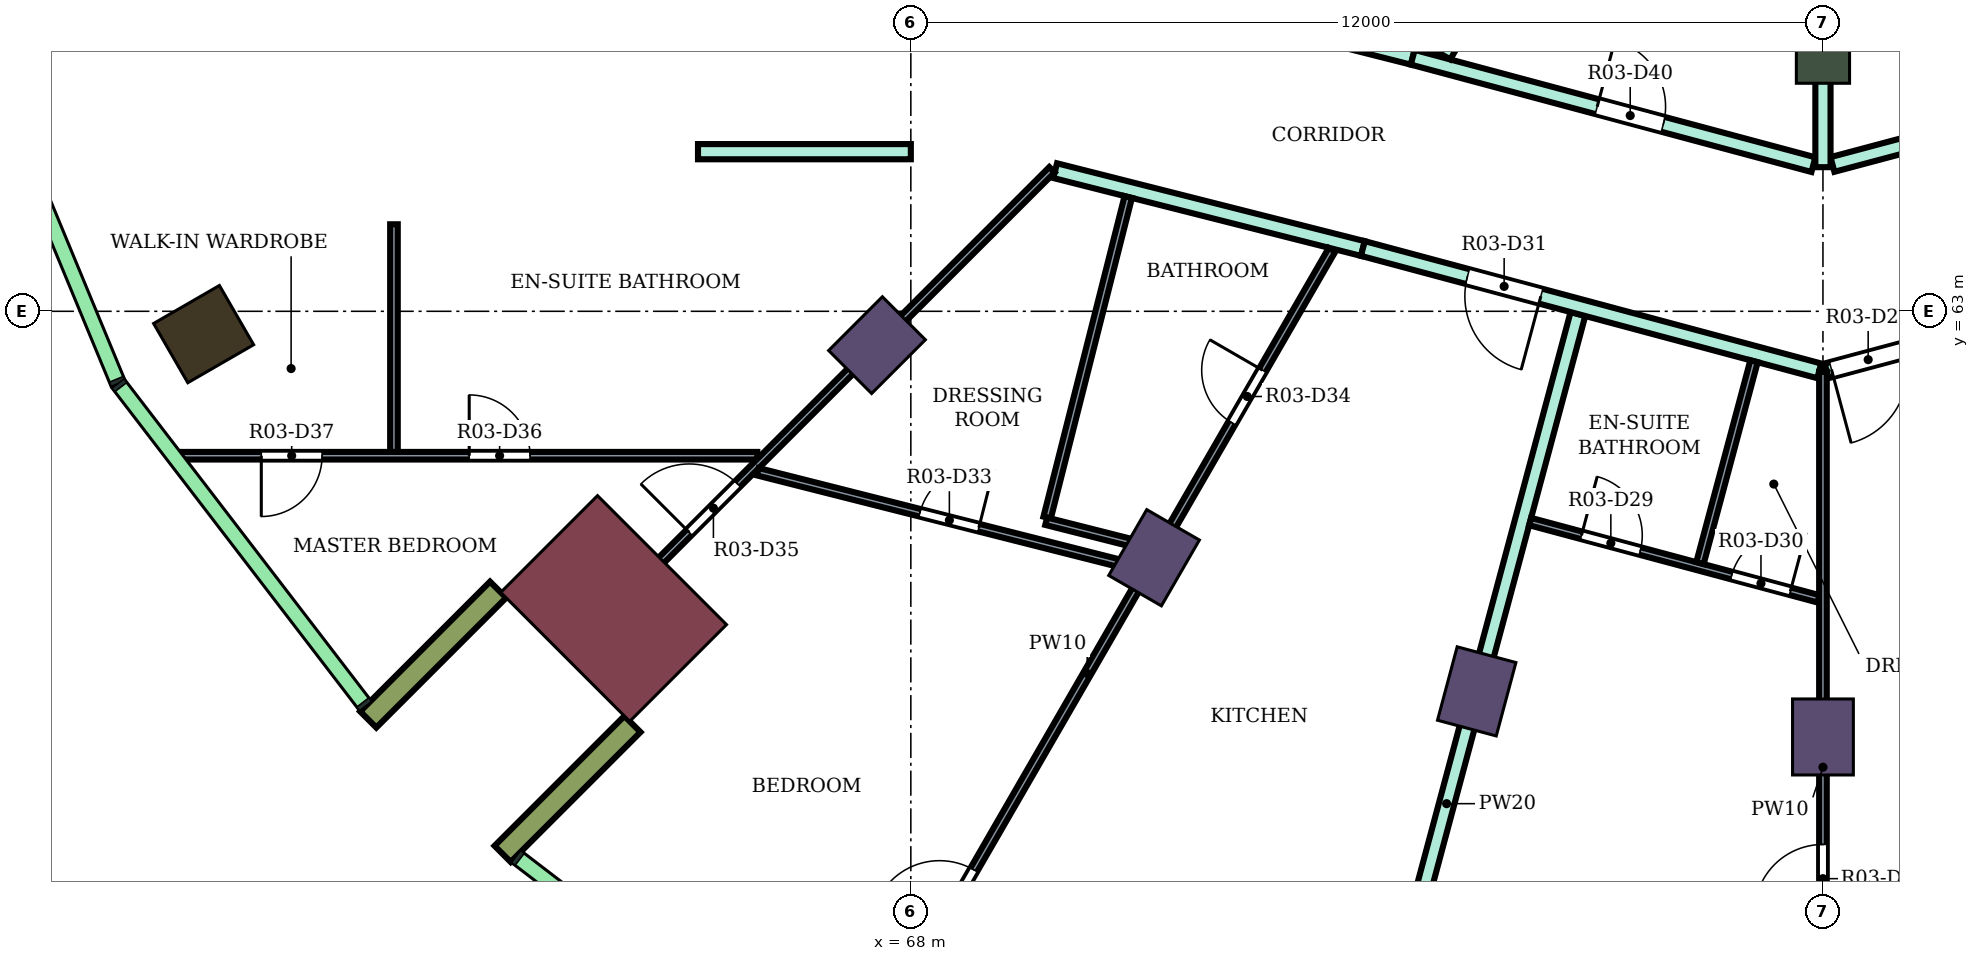
"""IFC4 building model, lengths in metres.
Left out: names, types, materials, properties, quantities, classifications, styles, units other than length and angle.
Written with IfcOpenShell. Run it as: python <this file> out.ifc"""

import sys

from ifc_helpers import new_model, si_unit, direction, frame, frame_2d, origin, origin_2d, place, context, subcontext, project, spatial, rectangle, extrude, element, fill, save


model = new_model("IFC4")
c1 = context("Model", 3, precision=1e-05, world=origin(), true_north=direction((0.0, 1.0)))
c2 = subcontext(c1, "Body", "Model", "MODEL_VIEW")
j1 = project(units=[si_unit("LENGTHUNIT", "METRE"), si_unit("PLANEANGLEUNIT", "RADIAN")], contexts=[c1])
p1 = place(None, origin())
s1 = spatial("IfcSite", under=j1, at=p1, CompositionType="ELEMENT")
p2 = place(p1, origin())
s2 = spatial("IfcBuilding", under=s1, at=p2, CompositionType="ELEMENT")
p3 = place(p2, frame((0.0, 0.0, 182.3)))
s3 = spatial("IfcBuildingStorey", under=s2, at=p3, CompositionType="ELEMENT", Elevation=182.3)
p4 = place(p3, frame((58.696, 62.7, 0.0), z_axis=(0.0, 0.0, 1.0), x_axis=(-0.866025403784, -0.5, 0.0)))
e1 = element("IfcColumn", 1, at=p4, inside=s3, PredefinedType="COLUMN", context=c2, shape_type="SweptSolid", body=[
    extrude(rectangle(XDim=1.0, YDim=0.9, at=origin_2d()), origin(), (0.0, 0.0, 1.0), 4.1),
])
for number, where, z_axis, x_axis in (
    (2, (67.555, 62.555, 0.0), (0.0, 0.0, 1.0), (-0.707, -0.707, 0.0)),
    (3, (71.2, 59.758, 0.0), (0.0, 0.0, 1.0), (-0.5, -0.866, 0.0)),
    (4, (75.445, 58.0, 0.0), (0.0, 0.0, 1.0), (-0.259, -0.966, 0.0)),
    (5, (80.0, 57.4, 0.0), (0.0, 0.0, 1.0), (0.0, -1.0, 0.0)),
):
    element("IfcColumn", number, at=place(p3, frame(where, z_axis=z_axis, x_axis=x_axis)), inside=s3, PredefinedType="COLUMN", context=c2, shape_type="SweptSolid", body=[
        extrude(rectangle(XDim=1.0, YDim=0.8, at=origin_2d()), origin(), (0.0, 0.0, 1.0), 4.1),
    ])
p5 = place(p3, frame((80.0, 66.4, 0.0), z_axis=(0.0, 0.0, 1.0), x_axis=(0.0, -1.0, 0.0)))
e6 = element("IfcColumn", 6, at=p5, inside=s3, PredefinedType="COLUMN", context=c2, shape_type="SweptSolid", body=[
    extrude(rectangle(XDim=0.8, YDim=0.7, at=origin_2d()), origin(), (0.0, 0.0, 1.0), 4.1),
])
p6 = place(p3, frame((64.09, 59.09, 0.0), z_axis=(0.0, 0.0, 1.0), x_axis=(-0.707106781187, -0.707106781187, 0.0)))
e7 = element("IfcColumn", 7, at=p6, inside=s3, PredefinedType="COLUMN", context=c2, shape_type="SweptSolid", body=[
    extrude(rectangle(XDim=1.8, YDim=2.4, at=origin_2d()), origin(), (0.0, 0.0, 1.0), 4.1),
])
for number, where, z_axis, x_axis in (
    (8, (62.57, 59.338, 0.0), (0.0, 0.0, 1.0), (-0.707, -0.707, 0.0)),
    (9, (64.338, 57.57, 0.0), (0.0, 0.0, 1.0), (-0.707, -0.707, 0.0)),
):
    element("IfcWall", number, at=place(p3, frame(where, z_axis=z_axis, x_axis=x_axis)), inside=s3, PredefinedType="NOTDEFINED", context=c2, shape_type="SweptSolid", body=[
        extrude(rectangle(XDim=2.416, YDim=0.3, at=frame_2d((1.208, 0.0))), origin(), (0.0, 0.0, 1.0), 4.1),
    ])
p7 = place(p3, frame((65.2, 65.1, 0.0), z_axis=(0.0, 0.0, 1.0), x_axis=(1.0, 0.0, 0.0)))
e10 = element("IfcWall", 10, at=p7, inside=s3, PredefinedType="PARTITIONING", context=c2, shape_type="SweptSolid", body=[
    extrude(rectangle(XDim=2.8, YDim=0.2, at=frame_2d((1.4, 0.0))), origin(), (0.0, 0.0, 1.0), 3.65),
])
p8 = place(p3, frame((69.899, 64.85, 0.0), z_axis=(0.0, 0.0, 1.0), x_axis=(0.969429930153, -0.245368316057, 0.0)))
e11 = element("IfcWall", 11, at=p8, inside=s3, PredefinedType="PARTITIONING", context=c2, shape_type="SweptSolid", body=[
    extrude(rectangle(XDim=4.176, YDim=0.2, at=frame_2d((2.088, 0.0))), origin(), (0.0, 0.0, 1.0), 3.65),
])
p9 = place(p3, frame((72.1, 66.975, 0.0), z_axis=(0.0, 0.0, 1.0), x_axis=(0.969471314457, -0.245204752086, 0.0)))
e12 = element("IfcWall", 12, at=p9, inside=s3, PredefinedType="PARTITIONING", context=c2, shape_type="SweptSolid", body=[
    extrude(rectangle(XDim=2.582, YDim=0.2, at=frame_2d((1.291, 0.0))), origin(), (0.0, 0.0, 1.0), 3.65),
])
p10 = place(p9, frame((0.841, 0.0, 0.0)))
e13 = element("IfcOpeningElement", 13, at=p10, cuts=e12, PredefinedType="OPENING", context=c2, shape_type="SweptSolid", body=[
    extrude(rectangle(XDim=0.9, YDim=2.1, at=frame_2d((0.45, 1.05))), frame((0.0, 0.11, 0.0), z_axis=(0.0, -1.0, 0.0), x_axis=(1.0, 0.0, 0.0)), (0.0, 0.0, 1.0), 0.22),
])
p11 = place(p3, frame((73.322, 50.081, 0.0), z_axis=(0.0, 0.0, 1.0), x_axis=(0.258965725415, 0.965886511481, 0.0)))
e14 = element("IfcWall", 14, at=p11, inside=s3, PredefinedType="PARTITIONING", context=c2, shape_type="SweptSolid", body=[
    extrude(rectangle(XDim=13.338, YDim=0.2, at=frame_2d((6.669, 0.0))), origin(), (0.0, 0.0, 1.0), 3.65),
])
p12 = place(p3, frame((73.947, 63.826, 0.0), z_axis=(0.0, 0.0, 1.0), x_axis=(0.965898432367, -0.258921258979, 0.0)))
e15 = element("IfcWall", 15, at=p12, inside=s3, PredefinedType="PARTITIONING", context=c2, shape_type="SweptSolid", body=[
    extrude(rectangle(XDim=6.217, YDim=0.2, at=frame_2d((3.108, 0.0))), origin(), (0.0, 0.0, 1.0), 3.65),
])
p13 = place(p12, frame((1.424, 0.0, 0.0)))
e16 = element("IfcOpeningElement", 16, at=p13, cuts=e15, PredefinedType="OPENING", context=c2, shape_type="SweptSolid", body=[
    extrude(rectangle(XDim=1.0, YDim=2.1, at=frame_2d((0.5, 1.05))), frame((0.0, 0.11, 0.0), z_axis=(0.0, -1.0, 0.0), x_axis=(1.0, 0.0, 0.0)), (0.0, 0.0, 1.0), 0.22),
])
p14 = place(p3, frame((74.603, 66.342, 0.0), z_axis=(0.0, 0.0, 1.0), x_axis=(0.965920893652, -0.258837453254, 0.0)))
e17 = element("IfcWall", 17, at=p14, inside=s3, PredefinedType="PARTITIONING", context=c2, shape_type="SweptSolid", body=[
    extrude(rectangle(XDim=5.458, YDim=0.2, at=frame_2d((2.729, 0.0))), origin(), (0.0, 0.0, 1.0), 3.65),
])
p15 = place(p14, frame((2.512, 0.0, 0.0)))
e18 = element("IfcOpeningElement", 18, at=p15, cuts=e17, PredefinedType="OPENING", context=c2, shape_type="SweptSolid", body=[
    extrude(rectangle(XDim=0.9, YDim=2.1, at=frame_2d((0.45, 1.05))), frame((0.0, 0.11, 0.0), z_axis=(0.0, -1.0, 0.0), x_axis=(1.0, 0.0, 0.0)), (0.0, 0.0, 1.0), 0.22),
])
p16 = place(p3, frame((75.01, 66.364, 0.0), z_axis=(0.0, 0.0, 1.0), x_axis=(0.500097042406, 0.865969369075, 0.0)))
e19 = element("IfcWall", 19, at=p16, inside=s3, PredefinedType="PARTITIONING", context=c2, shape_type="SweptSolid", body=[
    extrude(rectangle(XDim=2.275, YDim=0.2, at=frame_2d((1.138, 0.0))), origin(), (0.0, 0.0, 1.0), 3.65),
])
p17 = place(p3, frame((80.125, 64.932, 0.0), z_axis=(0.0, 0.0, 1.0), x_axis=(0.966236955806, 0.257655089674, 0.0)))
e20 = element("IfcWall", 20, at=p17, inside=s3, PredefinedType="PARTITIONING", context=c2, shape_type="SweptSolid", body=[
    extrude(rectangle(XDim=8.039, YDim=0.2, at=frame_2d((4.02, 0.0))), origin(), (0.0, 0.0, 1.0), 3.65),
])
p18 = place(p17, frame((6.298, 0.0, 0.0)))
e21 = element("IfcOpeningElement", 21, at=p18, cuts=e20, PredefinedType="OPENING", context=c2, shape_type="SweptSolid", body=[
    extrude(rectangle(XDim=0.9, YDim=2.1, at=frame_2d((0.45, 1.05))), frame((0.0, 0.11, 0.0), z_axis=(0.0, -1.0, 0.0), x_axis=(1.0, 0.0, 0.0)), (0.0, 0.0, 1.0), 0.22),
])
p19 = place(p17, frame((2.045, 0.0, 0.0)))
e22 = element("IfcOpeningElement", 22, at=p19, cuts=e20, PredefinedType="OPENING", context=c2, shape_type="SweptSolid", body=[
    extrude(rectangle(XDim=0.9, YDim=2.1, at=frame_2d((0.45, 1.05))), frame((0.0, 0.11, 0.0), z_axis=(0.0, -1.0, 0.0), x_axis=(1.0, 0.0, 0.0)), (0.0, 0.0, 1.0), 0.22),
])
p20 = place(p3, frame((80.048, 62.217, 0.0), z_axis=(0.0, 0.0, 1.0), x_axis=(0.965967276872, 0.258664299841, 0.0)))
e23 = element("IfcWall", 23, at=p20, inside=s3, PredefinedType="PARTITIONING", context=c2, shape_type="SweptSolid", body=[
    extrude(rectangle(XDim=6.007, YDim=0.2, at=frame_2d((3.003, 0.0))), origin(), (0.0, 0.0, 1.0), 3.65),
])
p21 = place(p20, frame((0.066, 0.0, 0.0)))
e24 = element("IfcOpeningElement", 24, at=p21, cuts=e23, PredefinedType="OPENING", context=c2, shape_type="SweptSolid", body=[
    extrude(rectangle(XDim=1.0, YDim=2.1, at=frame_2d((0.5, 1.05))), frame((0.0, 0.11, 0.0), z_axis=(0.0, -1.0, 0.0), x_axis=(1.0, 0.0, 0.0)), (0.0, 0.0, 1.0), 0.22),
])
p22 = place(p3, frame((80.0, 64.896, 0.0), z_axis=(0.0, 0.0, 1.0), x_axis=(0.0, 1.0, 0.0)))
e25 = element("IfcWall", 25, at=p22, inside=s3, PredefinedType="PARTITIONING", context=c2, shape_type="SweptSolid", body=[
    extrude(rectangle(XDim=2.405, YDim=0.2, at=frame_2d((1.203, 0.0))), origin(), (0.0, 0.0, 1.0), 3.65),
])
p23 = place(p3, frame((58.379, 61.1, 0.0), z_axis=(0.0, 0.0, 1.0), x_axis=(1.0, 0.0, 0.0)))
e26 = element("IfcWall", 26, at=p23, inside=s3, PredefinedType="PARTITIONING", context=c2, shape_type="SweptSolid", body=[
    extrude(rectangle(XDim=7.601, YDim=0.1, at=frame_2d((3.801, 0.0))), origin(), (0.0, 0.0, 1.0), 3.65),
])
p24 = place(p23, frame((3.811, 0.0, 0.0)))
e27 = element("IfcOpeningElement", 27, at=p24, cuts=e26, PredefinedType="OPENING", context=c2, shape_type="SweptSolid", body=[
    extrude(rectangle(XDim=0.8, YDim=2.1, at=frame_2d((0.4, 1.05))), frame((0.0, 0.06, 0.0), z_axis=(0.0, -1.0, 0.0), x_axis=(1.0, 0.0, 0.0)), (0.0, 0.0, 1.0), 0.12),
])
p25 = place(p23, frame((1.075, 0.0, 0.0)))
e28 = element("IfcOpeningElement", 28, at=p25, cuts=e26, PredefinedType="OPENING", context=c2, shape_type="SweptSolid", body=[
    extrude(rectangle(XDim=0.8, YDim=2.1, at=frame_2d((0.4, 1.05))), frame((0.0, 0.06, 0.0), z_axis=(0.0, -1.0, 0.0), x_axis=(1.0, 0.0, 0.0)), (0.0, 0.0, 1.0), 0.12),
])
p26 = place(p3, frame((61.2, 61.15, 0.0), z_axis=(0.0, 0.0, 1.0), x_axis=(0.0, 1.0, 0.0)))
e29 = element("IfcWall", 29, at=p26, inside=s3, PredefinedType="PARTITIONING", context=c2, shape_type="SweptSolid", body=[
    extrude(rectangle(XDim=2.995, YDim=0.1, at=frame_2d((1.498, 0.0))), origin(), (0.0, 0.0, 1.0), 3.65),
])
p27 = place(p3, frame((63.592, 58.6, 0.0), z_axis=(0.0, 0.0, 1.0), x_axis=(0.707272108928, 0.706941414781, 0.0)))
e30 = element("IfcWall", 30, at=p27, inside=s3, PredefinedType="PARTITIONING", context=c2, shape_type="SweptSolid", body=[
    extrude(rectangle(XDim=8.859, YDim=0.1, at=frame_2d((4.43, 0.0))), origin(), (0.0, 0.0, 1.0), 3.65),
])
p28 = place(p27, frame((2.111, 0.0, 0.0)))
e31 = element("IfcOpeningElement", 31, at=p28, cuts=e30, PredefinedType="OPENING", context=c2, shape_type="SweptSolid", body=[
    extrude(rectangle(XDim=0.9, YDim=2.1, at=frame_2d((0.45, 1.05))), frame((0.0, 0.06, 0.0), z_axis=(0.0, -1.0, 0.0), x_axis=(1.0, 0.0, 0.0)), (0.0, 0.0, 1.0), 0.12),
])
p29 = place(p3, frame((65.987, 60.889, 0.0), z_axis=(0.0, 0.0, 1.0), x_axis=(0.969431303535, -0.245362889871, 0.0)))
e32 = element("IfcWall", 32, at=p29, inside=s3, PredefinedType="PARTITIONING", context=c2, shape_type="SweptSolid", body=[
    extrude(rectangle(XDim=5.22, YDim=0.1, at=frame_2d((2.61, 0.0))), origin(), (0.0, 0.0, 1.0), 3.65),
])
p30 = place(p29, frame((2.2, 0.0, 0.0)))
e33 = element("IfcOpeningElement", 33, at=p30, cuts=e32, PredefinedType="OPENING", context=c2, shape_type="SweptSolid", body=[
    extrude(rectangle(XDim=0.8, YDim=2.1, at=frame_2d((0.4, 1.05))), frame((0.0, 0.06, 0.0), z_axis=(0.0, -1.0, 0.0), x_axis=(1.0, 0.0, 0.0)), (0.0, 0.0, 1.0), 0.12),
])
p31 = place(p3, frame((67.099, 52.66, 0.0), z_axis=(0.0, 0.0, 1.0), x_axis=(0.500286442712, 0.865859962834, 0.0)))
e34 = element("IfcWall", 34, at=p31, inside=s3, PredefinedType="PARTITIONING", context=c2, shape_type="SweptSolid", body=[
    extrude(rectangle(XDim=12.876, YDim=0.1, at=frame_2d((6.438, 0.0))), origin(), (0.0, 0.0, 1.0), 3.65),
])
p32 = place(p31, frame((2.556, 0.0, 0.0)))
e35 = element("IfcOpeningElement", 35, at=p32, cuts=e34, PredefinedType="OPENING", context=c2, shape_type="SweptSolid", body=[
    extrude(rectangle(XDim=0.9, YDim=2.1, at=frame_2d((0.45, 1.05))), frame((0.0, 0.06, 0.0), z_axis=(0.0, -1.0, 0.0), x_axis=(1.0, 0.0, 0.0)), (0.0, 0.0, 1.0), 0.12),
])
p33 = place(p31, frame((10.248, 0.0, 0.0)))
e36 = element("IfcOpeningElement", 36, at=p33, cuts=e34, PredefinedType="OPENING", context=c2, shape_type="SweptSolid", body=[
    extrude(rectangle(XDim=0.8, YDim=2.1, at=frame_2d((0.4, 1.05))), frame((0.0, 0.06, 0.0), z_axis=(0.0, -1.0, 0.0), x_axis=(1.0, 0.0, 0.0)), (0.0, 0.0, 1.0), 0.12),
])
p34 = place(p3, frame((69.793, 60.287, 0.0), z_axis=(0.0, 0.0, 1.0), x_axis=(0.245307703654, 0.969445269486, 0.0)))
e37 = element("IfcWall", 37, at=p34, inside=s3, PredefinedType="PARTITIONING", context=c2, shape_type="SweptSolid", body=[
    extrude(rectangle(XDim=4.35, YDim=0.1, at=frame_2d((2.175, 0.0))), origin(), (0.0, 0.0, 1.0), 3.65),
])
p35 = place(p3, frame((69.781, 60.238, 0.0), z_axis=(0.0, 0.0, 1.0), x_axis=(0.969502558328, -0.245081189397, 0.0)))
e38 = element("IfcWall", 38, at=p35, inside=s3, PredefinedType="PARTITIONING", context=c2, shape_type="SweptSolid", body=[
    extrude(rectangle(XDim=1.466, YDim=0.1, at=frame_2d((0.733, 0.0))), origin(), (0.0, 0.0, 1.0), 3.65),
])
p36 = place(p3, frame((76.147, 60.234, 0.0), z_axis=(0.0, 0.0, 1.0), x_axis=(0.965925861199, -0.258818914816, 0.0)))
e39 = element("IfcWall", 39, at=p36, inside=s3, PredefinedType="PARTITIONING", context=c2, shape_type="SweptSolid", body=[
    extrude(rectangle(XDim=3.929, YDim=0.1, at=frame_2d((1.964, 0.0))), origin(), (0.0, 0.0, 1.0), 3.65),
])
p37 = place(p36, frame((0.7, 0.0, 0.0)))
e40 = element("IfcOpeningElement", 40, at=p37, cuts=e39, PredefinedType="OPENING", context=c2, shape_type="SweptSolid", body=[
    extrude(rectangle(XDim=0.8, YDim=2.1, at=frame_2d((0.4, 1.05))), frame((0.0, 0.06, 0.0), z_axis=(0.0, -1.0, 0.0), x_axis=(1.0, 0.0, 0.0)), (0.0, 0.0, 1.0), 0.12),
])
p38 = place(p36, frame((2.745, 0.0, 0.0)))
e41 = element("IfcOpeningElement", 41, at=p38, cuts=e39, PredefinedType="OPENING", context=c2, shape_type="SweptSolid", body=[
    extrude(rectangle(XDim=0.8, YDim=2.1, at=frame_2d((0.4, 1.05))), frame((0.0, 0.06, 0.0), z_axis=(0.0, -1.0, 0.0), x_axis=(1.0, 0.0, 0.0)), (0.0, 0.0, 1.0), 0.12),
])
p39 = place(p3, frame((78.382, 59.687, 0.0), z_axis=(0.0, 0.0, 1.0), x_axis=(0.258629573817, 0.965976575051, 0.0)))
e42 = element("IfcWall", 42, at=p39, inside=s3, PredefinedType="PARTITIONING", context=c2, shape_type="SweptSolid", body=[
    extrude(rectangle(XDim=2.75, YDim=0.1, at=frame_2d((1.375, 0.0))), origin(), (0.0, 0.0, 1.0), 3.65),
])
p40 = place(p3, frame((80.0, 51.8, 0.0), z_axis=(0.0, 0.0, 1.0), x_axis=(0.0, 1.0, 0.0)))
e43 = element("IfcWall", 43, at=p40, inside=s3, PredefinedType="PARTITIONING", context=c2, shape_type="SweptSolid", body=[
    extrude(rectangle(XDim=10.404, YDim=0.1, at=frame_2d((5.202, 0.0))), origin(), (0.0, 0.0, 1.0), 3.65),
])
p41 = place(p40, frame((3.286, 0.0, 0.0)))
e44 = element("IfcOpeningElement", 44, at=p41, cuts=e43, PredefinedType="OPENING", context=c2, shape_type="SweptSolid", body=[
    extrude(rectangle(XDim=0.9, YDim=2.1, at=frame_2d((0.45, 1.05))), frame((0.0, 0.06, 0.0), z_axis=(0.0, -1.0, 0.0), x_axis=(1.0, 0.0, 0.0)), (0.0, 0.0, 1.0), 0.12),
])
p42 = place(p21, frame((1.0, 0.0, 0.0), z_axis=(0.0, 0.0, 1.0), x_axis=(-1.0, 0.0, 0.0)))
e45 = element("IfcDoor", 45, at=p42, inside=s3, OperationType="SINGLE_SWING_RIGHT", PredefinedType="DOOR", context=c2, shape_type="SweptSolid", body=[
    extrude(rectangle(XDim=1.0, YDim=2.1, at=frame_2d((0.5, 1.05))), frame((0.0, 0.025, 0.0), z_axis=(0.0, -1.0, 0.0), x_axis=(1.0, 0.0, 0.0)), (0.0, 0.0, 1.0), 0.05),
])
fill(e24, e45)
p43 = place(p41, origin())
e46 = element("IfcDoor", 46, at=p43, inside=s3, OperationType="SINGLE_SWING_LEFT", PredefinedType="DOOR", context=c2, shape_type="SweptSolid", body=[
    extrude(rectangle(XDim=0.9, YDim=2.1, at=frame_2d((0.45, 1.05))), frame((0.0, 0.025, 0.0), z_axis=(0.0, -1.0, 0.0), x_axis=(1.0, 0.0, 0.0)), (0.0, 0.0, 1.0), 0.05),
])
fill(e44, e46)
p44 = place(p37, origin())
e47 = element("IfcDoor", 47, at=p44, inside=s3, OperationType="SINGLE_SWING_LEFT", PredefinedType="DOOR", context=c2, shape_type="SweptSolid", body=[
    extrude(rectangle(XDim=0.8, YDim=2.1, at=frame_2d((0.4, 1.05))), frame((0.0, 0.025, 0.0), z_axis=(0.0, -1.0, 0.0), x_axis=(1.0, 0.0, 0.0)), (0.0, 0.0, 1.0), 0.05),
])
fill(e40, e47)
p45 = place(p38, origin())
e48 = element("IfcDoor", 48, at=p45, inside=s3, OperationType="SINGLE_SWING_RIGHT", PredefinedType="DOOR", context=c2, shape_type="SweptSolid", body=[
    extrude(rectangle(XDim=0.8, YDim=2.1, at=frame_2d((0.4, 1.05))), frame((0.0, 0.025, 0.0), z_axis=(0.0, -1.0, 0.0), x_axis=(1.0, 0.0, 0.0)), (0.0, 0.0, 1.0), 0.05),
])
fill(e41, e48)
p46 = place(p13, frame((1.0, 0.0, 0.0), z_axis=(0.0, 0.0, 1.0), x_axis=(-1.0, 0.0, 0.0)))
e49 = element("IfcDoor", 49, at=p46, inside=s3, OperationType="SINGLE_SWING_LEFT", PredefinedType="DOOR", context=c2, shape_type="SweptSolid", body=[
    extrude(rectangle(XDim=1.0, YDim=2.1, at=frame_2d((0.5, 1.05))), frame((0.0, 0.025, 0.0), z_axis=(0.0, -1.0, 0.0), x_axis=(1.0, 0.0, 0.0)), (0.0, 0.0, 1.0), 0.05),
])
fill(e16, e49)
p47 = place(p32, origin())
e50 = element("IfcDoor", 50, at=p47, inside=s3, OperationType="SINGLE_SWING_LEFT", PredefinedType="DOOR", context=c2, shape_type="SweptSolid", body=[
    extrude(rectangle(XDim=0.9, YDim=2.1, at=frame_2d((0.45, 1.05))), frame((0.0, 0.025, 0.0), z_axis=(0.0, -1.0, 0.0), x_axis=(1.0, 0.0, 0.0)), (0.0, 0.0, 1.0), 0.05),
])
fill(e35, e50)
p48 = place(p30, origin())
e51 = element("IfcDoor", 51, at=p48, inside=s3, OperationType="SINGLE_SWING_RIGHT", PredefinedType="DOOR", context=c2, shape_type="SweptSolid", body=[
    extrude(rectangle(XDim=0.8, YDim=2.1, at=frame_2d((0.4, 1.05))), frame((0.0, 0.025, 0.0), z_axis=(0.0, -1.0, 0.0), x_axis=(1.0, 0.0, 0.0)), (0.0, 0.0, 1.0), 0.05),
])
fill(e33, e51)
p49 = place(p33, origin())
e52 = element("IfcDoor", 52, at=p49, inside=s3, OperationType="SINGLE_SWING_RIGHT", PredefinedType="DOOR", context=c2, shape_type="SweptSolid", body=[
    extrude(rectangle(XDim=0.8, YDim=2.1, at=frame_2d((0.4, 1.05))), frame((0.0, 0.025, 0.0), z_axis=(0.0, -1.0, 0.0), x_axis=(1.0, 0.0, 0.0)), (0.0, 0.0, 1.0), 0.05),
])
fill(e36, e52)
p50 = place(p28, origin())
e53 = element("IfcDoor", 53, at=p50, inside=s3, OperationType="SINGLE_SWING_LEFT", PredefinedType="DOOR", context=c2, shape_type="SweptSolid", body=[
    extrude(rectangle(XDim=0.9, YDim=2.1, at=frame_2d((0.45, 1.05))), frame((0.0, 0.025, 0.0), z_axis=(0.0, -1.0, 0.0), x_axis=(1.0, 0.0, 0.0)), (0.0, 0.0, 1.0), 0.05),
])
fill(e31, e53)
p51 = place(p24, origin())
e54 = element("IfcDoor", 54, at=p51, inside=s3, OperationType="SINGLE_SWING_LEFT", PredefinedType="DOOR", context=c2, shape_type="SweptSolid", body=[
    extrude(rectangle(XDim=0.8, YDim=2.1, at=frame_2d((0.4, 1.05))), frame((0.0, 0.025, 0.0), z_axis=(0.0, -1.0, 0.0), x_axis=(1.0, 0.0, 0.0)), (0.0, 0.0, 1.0), 0.05),
])
fill(e27, e54)
p52 = place(p25, frame((0.8, 0.0, 0.0), z_axis=(0.0, 0.0, 1.0), x_axis=(-1.0, 0.0, 0.0)))
e55 = element("IfcDoor", 55, at=p52, inside=s3, OperationType="SINGLE_SWING_RIGHT", PredefinedType="DOOR", context=c2, shape_type="SweptSolid", body=[
    extrude(rectangle(XDim=0.8, YDim=2.1, at=frame_2d((0.4, 1.05))), frame((0.0, 0.025, 0.0), z_axis=(0.0, -1.0, 0.0), x_axis=(1.0, 0.0, 0.0)), (0.0, 0.0, 1.0), 0.05),
])
fill(e28, e55)
p53 = place(p15, origin())
e56 = element("IfcDoor", 56, at=p53, inside=s3, OperationType="SINGLE_SWING_LEFT", PredefinedType="DOOR", context=c2, shape_type="SweptSolid", body=[
    extrude(rectangle(XDim=0.9, YDim=2.1, at=frame_2d((0.45, 1.05))), frame((0.0, 0.025, 0.0), z_axis=(0.0, -1.0, 0.0), x_axis=(1.0, 0.0, 0.0)), (0.0, 0.0, 1.0), 0.05),
])
fill(e18, e56)
save(model, sys.argv[1])
